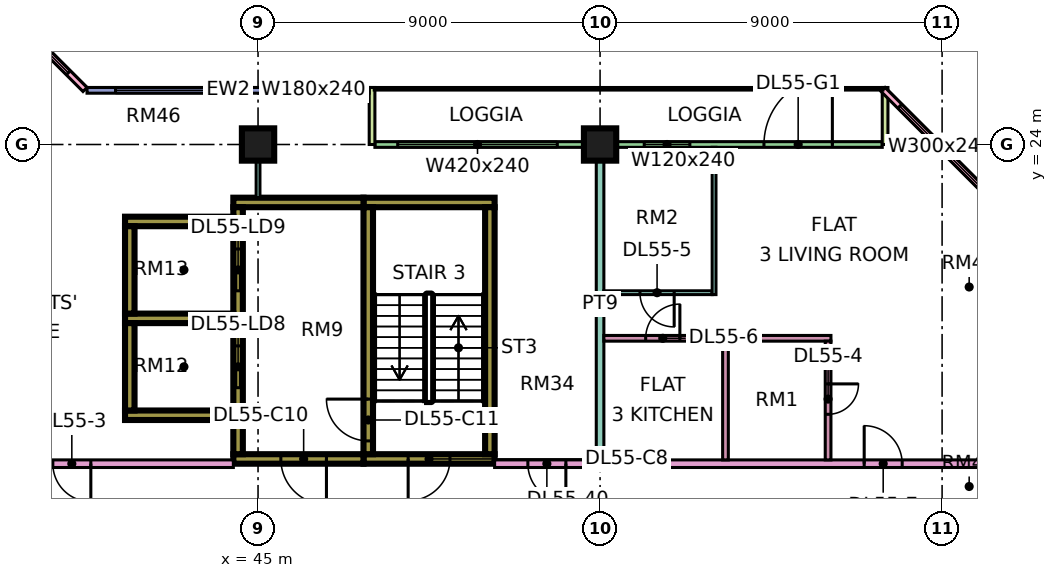
"""IFC4 building model, lengths in metres.
Left out: names, types, materials, properties, quantities, classifications, styles, units other than length and angle.
Written with IfcOpenShell. Run it as: python <this file> out.ifc"""

import sys

from ifc_helpers import new_model, si_unit, direction, frame, frame_2d, origin, origin_2d, place, context, subcontext, project, spatial, rectangle, extrude, element, fill, save


model = new_model("IFC4")
c1 = context("Model", 3, precision=1e-05, world=origin(), true_north=direction((0.0, 1.0)))
c2 = subcontext(c1, "Body", "Model", "MODEL_VIEW")
j1 = project(units=[si_unit("LENGTHUNIT", "METRE"), si_unit("PLANEANGLEUNIT", "RADIAN")], contexts=[c1])
p1 = place(None, origin())
s1 = spatial("IfcSite", under=j1, at=p1, CompositionType="ELEMENT")
p2 = place(p1, origin())
s2 = spatial("IfcBuilding", under=s1, at=p2, CompositionType="ELEMENT")
p3 = place(p2, frame((0.0, 0.0, 234.15)))
s3 = spatial("IfcBuildingStorey", under=s2, at=p3, CompositionType="ELEMENT", Elevation=234.15)
for number, where, z_axis, x_axis in (
    (1, (45.0, 24.0, 0.0), (0.0, 0.0, 1.0), (1.0, 0.0, 0.0)),
    (2, (54.0, 24.0, 0.0), (0.0, 0.0, 1.0), (1.0, 0.0, 0.0)),
):
    element("IfcColumn", number, at=place(p3, frame(where, z_axis=z_axis, x_axis=x_axis)), inside=s3, PredefinedType="COLUMN", context=c2, shape_type="SweptSolid", body=[
        extrude(rectangle(XDim=0.85, YDim=0.85, at=origin_2d()), origin(), (0.0, 0.0, 1.0), 3.75),
    ])
p4 = place(p3, frame((47.775, 15.725, 0.0), z_axis=(0.0, 0.0, 1.0), x_axis=(1.0, 0.0, 0.0)))
e3 = element("IfcWall", 3, at=p4, inside=s3, PredefinedType="SHEAR", context=c2, shape_type="SweptSolid", body=[
    extrude(rectangle(XDim=3.45, YDim=0.25, at=frame_2d((1.725, 0.0))), origin(), (0.0, 0.0, 1.0), 3.75),
])
p5 = place(p4, frame((1.175, 0.0, 0.0)))
e4 = element("IfcOpeningElement", 4, at=p5, cuts=e3, PredefinedType="OPENING", context=c2, shape_type="SweptSolid", body=[
    extrude(rectangle(XDim=1.1, YDim=2.2, at=frame_2d((0.55, 1.1))), frame((0.0, 0.135, 0.0), z_axis=(0.0, -1.0, 0.0), x_axis=(1.0, 0.0, 0.0)), (0.0, 0.0, 1.0), 0.27),
])
p6 = place(p3, frame((47.775, 22.475, 0.0), z_axis=(0.0, 0.0, 1.0), x_axis=(1.0, 0.0, 0.0)))
e5 = element("IfcWall", 5, at=p6, inside=s3, PredefinedType="SHEAR", context=c2, shape_type="SweptSolid", body=[
    extrude(rectangle(XDim=3.45, YDim=0.25, at=frame_2d((1.725, 0.0))), origin(), (0.0, 0.0, 1.0), 3.75),
])
p7 = place(p3, frame((47.9, 15.85, 0.0), z_axis=(0.0, 0.0, 1.0), x_axis=(0.0, 1.0, 0.0)))
e6 = element("IfcWall", 6, at=p7, inside=s3, PredefinedType="SHEAR", context=c2, shape_type="SweptSolid", body=[
    extrude(rectangle(XDim=6.5, YDim=0.25, at=frame_2d((3.25, 0.0))), origin(), (0.0, 0.0, 1.0), 3.75),
])
p8 = place(p7, frame((0.35, 0.0, 0.0)))
e7 = element("IfcOpeningElement", 7, at=p8, cuts=e6, PredefinedType="OPENING", context=c2, shape_type="SweptSolid", body=[
    extrude(rectangle(XDim=1.1, YDim=2.2, at=frame_2d((0.55, 1.1))), frame((0.0, 0.135, 0.0), z_axis=(0.0, -1.0, 0.0), x_axis=(1.0, 0.0, 0.0)), (0.0, 0.0, 1.0), 0.27),
])
p9 = place(p3, frame((51.1, 15.85, 0.0), z_axis=(0.0, 0.0, 1.0), x_axis=(0.0, 1.0, 0.0)))
e8 = element("IfcWall", 8, at=p9, inside=s3, PredefinedType="SHEAR", context=c2, shape_type="SweptSolid", body=[
    extrude(rectangle(XDim=6.5, YDim=0.25, at=frame_2d((3.25, 0.0))), origin(), (0.0, 0.0, 1.0), 3.75),
])
p10 = place(p3, frame((44.35, 15.725, 0.0), z_axis=(0.0, 0.0, 1.0), x_axis=(1.0, 0.0, 0.0)))
e9 = element("IfcWall", 9, at=p10, inside=s3, PredefinedType="SHEAR", context=c2, shape_type="SweptSolid", body=[
    extrude(rectangle(XDim=3.425, YDim=0.25, at=frame_2d((1.712, 0.0))), origin(), (0.0, 0.0, 1.0), 3.75),
])
p11 = place(p10, frame((1.25, 0.0, 0.0)))
e10 = element("IfcOpeningElement", 10, at=p11, cuts=e9, PredefinedType="OPENING", context=c2, shape_type="SweptSolid", body=[
    extrude(rectangle(XDim=1.2, YDim=2.2, at=frame_2d((0.6, 1.1))), frame((0.0, 0.135, 0.0), z_axis=(0.0, -1.0, 0.0), x_axis=(1.0, 0.0, 0.0)), (0.0, 0.0, 1.0), 0.27),
])
p12 = place(p3, frame((44.35, 22.475, 0.0), z_axis=(0.0, 0.0, 1.0), x_axis=(1.0, 0.0, 0.0)))
e11 = element("IfcWall", 11, at=p12, inside=s3, PredefinedType="SHEAR", context=c2, shape_type="SweptSolid", body=[
    extrude(rectangle(XDim=3.425, YDim=0.25, at=frame_2d((1.712, 0.0))), origin(), (0.0, 0.0, 1.0), 3.75),
])
p13 = place(p3, frame((44.475, 15.85, 0.0), z_axis=(0.0, 0.0, 1.0), x_axis=(0.0, 1.0, 0.0)))
e12 = element("IfcWall", 12, at=p13, inside=s3, PredefinedType="SHEAR", context=c2, shape_type="SweptSolid", body=[
    extrude(rectangle(XDim=6.5, YDim=0.25, at=frame_2d((3.25, 0.0))), origin(), (0.0, 0.0, 1.0), 3.75),
])
p14 = place(p13, frame((1.75, 0.0, 0.0)))
e13 = element("IfcOpeningElement", 13, at=p14, cuts=e12, PredefinedType="OPENING", context=c2, shape_type="SweptSolid", body=[
    extrude(rectangle(XDim=1.1, YDim=2.2, at=frame_2d((0.55, 1.1))), frame((0.0, 0.135, 0.0), z_axis=(0.0, -1.0, 0.0), x_axis=(1.0, 0.0, 0.0)), (0.0, 0.0, 1.0), 0.27),
])
p15 = place(p13, frame((4.3, 0.0, 0.0)))
e14 = element("IfcOpeningElement", 14, at=p15, cuts=e12, PredefinedType="OPENING", context=c2, shape_type="SweptSolid", body=[
    extrude(rectangle(XDim=1.1, YDim=2.2, at=frame_2d((0.55, 1.1))), frame((0.0, 0.135, 0.0), z_axis=(0.0, -1.0, 0.0), x_axis=(1.0, 0.0, 0.0)), (0.0, 0.0, 1.0), 0.27),
])
for number, where, z_axis, x_axis in (
    (15, (41.5, 16.875, 0.0), (0.0, 0.0, 1.0), (1.0, 0.0, 0.0)),
    (16, (41.5, 19.425, 0.0), (0.0, 0.0, 1.0), (1.0, 0.0, 0.0)),
    (17, (41.5, 21.975, 0.0), (0.0, 0.0, 1.0), (1.0, 0.0, 0.0)),
):
    element("IfcWall", number, at=place(p3, frame(where, z_axis=z_axis, x_axis=x_axis)), inside=s3, PredefinedType="SHEAR", context=c2, shape_type="SweptSolid", body=[
        extrude(rectangle(XDim=2.85, YDim=0.25, at=frame_2d((1.425, 0.0))), origin(), (0.0, 0.0, 1.0), 3.75),
    ])
for number, where, z_axis, x_axis in (
    (18, (41.625, 17.0, 0.0), (0.0, 0.0, 1.0), (0.0, 1.0, 0.0)),
    (19, (41.625, 19.55, 0.0), (0.0, 0.0, 1.0), (0.0, 1.0, 0.0)),
):
    element("IfcWall", number, at=place(p3, frame(where, z_axis=z_axis, x_axis=x_axis)), inside=s3, PredefinedType="SHEAR", context=c2, shape_type="SweptSolid", body=[
        extrude(rectangle(XDim=2.3, YDim=0.25, at=frame_2d((1.15, 0.0))), origin(), (0.0, 0.0, 1.0), 3.75),
    ])
p16 = place(p3, frame((61.425, 24.0, 0.0), z_axis=(0.0, 0.0, 1.0), x_axis=(-1.0, 0.0, 0.0)))
e20 = element("IfcWall", 20, at=p16, inside=s3, PredefinedType="SOLIDWALL", context=c2, shape_type="SweptSolid", body=[
    extrude(rectangle(XDim=13.35, YDim=0.15, at=frame_2d((6.675, 0.0))), origin(), (0.0, 0.0, 1.0), 3.35),
])
p17 = place(p16, frame((1.312, 0.0, 0.0)))
e21 = element("IfcOpeningElement", 21, at=p17, cuts=e20, PredefinedType="OPENING", context=c2, shape_type="SweptSolid", body=[
    extrude(rectangle(XDim=1.8, YDim=2.4, at=frame_2d((0.9, 1.2))), frame((0.0, 0.085, 0.0), z_axis=(0.0, -1.0, 0.0), x_axis=(1.0, 0.0, 0.0)), (0.0, 0.0, 1.0), 0.17),
])
p18 = place(p16, frame((5.062, 0.0, 0.45)))
e22 = element("IfcOpeningElement", 22, at=p18, cuts=e20, PredefinedType="OPENING", context=c2, shape_type="SweptSolid", body=[
    extrude(rectangle(XDim=1.2, YDim=2.4, at=frame_2d((0.6, 1.2))), frame((0.0, 0.085, 0.0), z_axis=(0.0, -1.0, 0.0), x_axis=(1.0, 0.0, 0.0)), (0.0, 0.0, 1.0), 0.17),
])
p19 = place(p16, frame((8.55, 0.0, 0.45)))
e23 = element("IfcOpeningElement", 23, at=p19, cuts=e20, PredefinedType="OPENING", context=c2, shape_type="SweptSolid", body=[
    extrude(rectangle(XDim=4.2, YDim=2.4, at=frame_2d((2.1, 1.2))), frame((0.0, 0.085, 0.0), z_axis=(0.0, -1.0, 0.0), x_axis=(1.0, 0.0, 0.0)), (0.0, 0.0, 1.0), 0.17),
])
for number, where, z_axis, x_axis in (
    (24, (61.5, 25.5, 0.0), (0.0, 0.0, 1.0), (0.0, -1.0, 0.0)),
    (25, (48.0, 25.5, 0.0), (0.0, 0.0, 1.0), (0.0, -1.0, 0.0)),
):
    element("IfcWall", number, at=place(p3, frame(where, z_axis=z_axis, x_axis=x_axis)), inside=s3, PredefinedType="SOLIDWALL", context=c2, shape_type="SweptSolid", body=[
        extrude(rectangle(XDim=1.5, YDim=0.15, at=frame_2d((0.75, 0.0))), origin(), (0.0, 0.0, 1.0), 3.35),
    ])
p20 = place(p3, frame((47.925, 25.425, 0.0), z_axis=(0.0, 0.0, 1.0), x_axis=(-1.0, 0.0, 0.0)))
e26 = element("IfcWall", 26, at=p20, inside=s3, PredefinedType="SOLIDWALL", context=c2, shape_type="SweptSolid", body=[
    extrude(rectangle(XDim=7.425, YDim=0.15, at=frame_2d((3.712, 0.0))), origin(), (0.0, 0.0, 1.0), 3.35),
])
p21 = place(p20, frame((0.562, 0.0, 0.45)))
e27 = element("IfcOpeningElement", 27, at=p21, cuts=e26, PredefinedType="OPENING", context=c2, shape_type="SweptSolid", body=[
    extrude(rectangle(XDim=1.8, YDim=2.4, at=frame_2d((0.9, 1.2))), frame((0.0, 0.085, 0.0), z_axis=(0.0, -1.0, 0.0), x_axis=(1.0, 0.0, 0.0)), (0.0, 0.0, 1.0), 0.17),
])
p22 = place(p20, frame((3.675, 0.0, 0.45)))
e28 = element("IfcOpeningElement", 28, at=p22, cuts=e26, PredefinedType="OPENING", context=c2, shape_type="SweptSolid", body=[
    extrude(rectangle(XDim=3.0, YDim=2.4, at=frame_2d((1.5, 1.2))), frame((0.0, 0.085, 0.0), z_axis=(0.0, -1.0, 0.0), x_axis=(1.0, 0.0, 0.0)), (0.0, 0.0, 1.0), 0.17),
])
p23 = place(p3, frame((40.447, 25.447, 0.0), z_axis=(0.0, 0.0, 1.0), x_axis=(-0.707106781187, 0.707106781187, 0.0)))
e29 = element("IfcWall", 29, at=p23, inside=s3, PredefinedType="SOLIDWALL", context=c2, shape_type="SweptSolid", body=[
    extrude(rectangle(XDim=4.243, YDim=0.15, at=frame_2d((2.121, 0.0))), origin(), (0.0, 0.0, 1.0), 3.35),
])
p24 = place(p23, frame((0.621, 0.0, 0.45)))
e30 = element("IfcOpeningElement", 30, at=p24, cuts=e29, PredefinedType="OPENING", context=c2, shape_type="SweptSolid", body=[
    extrude(rectangle(XDim=3.0, YDim=2.4, at=frame_2d((1.5, 1.2))), frame((0.0, 0.085, 0.0), z_axis=(0.0, -1.0, 0.0), x_axis=(1.0, 0.0, 0.0)), (0.0, 0.0, 1.0), 0.17),
])
p25 = place(p3, frame((64.447, 22.447, 0.0), z_axis=(0.0, 0.0, 1.0), x_axis=(-0.707106781187, 0.707106781187, 0.0)))
e31 = element("IfcWall", 31, at=p25, inside=s3, PredefinedType="SOLIDWALL", context=c2, shape_type="SweptSolid", body=[
    extrude(rectangle(XDim=4.243, YDim=0.15, at=frame_2d((2.121, 0.0))), origin(), (0.0, 0.0, 1.0), 3.35),
])
p26 = place(p25, frame((0.621, 0.0, 0.45)))
e32 = element("IfcOpeningElement", 32, at=p26, cuts=e31, PredefinedType="OPENING", context=c2, shape_type="SweptSolid", body=[
    extrude(rectangle(XDim=3.0, YDim=2.4, at=frame_2d((1.5, 1.2))), frame((0.0, 0.085, 0.0), z_axis=(0.0, -1.0, 0.0), x_axis=(1.0, 0.0, 0.0)), (0.0, 0.0, 1.0), 0.17),
])
p27 = place(p3, frame((34.0, 15.6, 0.0), z_axis=(0.0, 0.0, 1.0), x_axis=(1.0, 0.0, 0.0)))
e33 = element("IfcWall", 33, at=p27, inside=s3, PredefinedType="PARTITIONING", context=c2, shape_type="SweptSolid", body=[
    extrude(rectangle(XDim=10.35, YDim=0.2, at=frame_2d((5.175, 0.0))), origin(), (0.0, 0.0, 1.0), 3.35),
])
p28 = place(p27, frame((5.6, 0.0, 0.0)))
e34 = element("IfcOpeningElement", 34, at=p28, cuts=e33, PredefinedType="OPENING", context=c2, shape_type="SweptSolid", body=[
    extrude(rectangle(XDim=1.0, YDim=2.1, at=frame_2d((0.5, 1.05))), frame((0.0, 0.11, 0.0), z_axis=(0.0, -1.0, 0.0), x_axis=(1.0, 0.0, 0.0)), (0.0, 0.0, 1.0), 0.22),
])
p29 = place(p27, frame((0.45, 0.0, 0.0)))
e35 = element("IfcOpeningElement", 35, at=p29, cuts=e33, PredefinedType="OPENING", context=c2, shape_type="SweptSolid", body=[
    extrude(rectangle(XDim=1.2, YDim=2.1, at=frame_2d((0.6, 1.05))), frame((0.0, 0.11, 0.0), z_axis=(0.0, -1.0, 0.0), x_axis=(1.0, 0.0, 0.0)), (0.0, 0.0, 1.0), 0.22),
])
p30 = place(p3, frame((45.0, 22.6, 0.0), z_axis=(0.0, 0.0, 1.0), x_axis=(0.0, 1.0, 0.0)))
e36 = element("IfcWall", 36, at=p30, inside=s3, PredefinedType="PARTITIONING", context=c2, shape_type="SweptSolid", body=[
    extrude(rectangle(XDim=1.4, YDim=0.1, at=frame_2d((0.7, 0.0))), origin(), (0.0, 0.0, 1.0), 3.35),
])
p31 = place(p3, frame((51.225, 15.6, 0.0), z_axis=(0.0, 0.0, 1.0), x_axis=(1.0, 0.0, 0.0)))
e37 = element("IfcWall", 37, at=p31, inside=s3, PredefinedType="PARTITIONING", context=c2, shape_type="SweptSolid", body=[
    extrude(rectangle(XDim=13.125, YDim=0.2, at=frame_2d((6.562, 0.0))), origin(), (0.0, 0.0, 1.0), 3.35),
])
p32 = place(p31, frame((9.725, 0.0, 0.0)))
e38 = element("IfcOpeningElement", 38, at=p32, cuts=e37, PredefinedType="OPENING", context=c2, shape_type="SweptSolid", body=[
    extrude(rectangle(XDim=1.0, YDim=2.1, at=frame_2d((0.5, 1.05))), frame((0.0, 0.11, 0.0), z_axis=(0.0, -1.0, 0.0), x_axis=(1.0, 0.0, 0.0)), (0.0, 0.0, 1.0), 0.22),
])
p33 = place(p31, frame((0.875, 0.0, 0.0)))
e39 = element("IfcOpeningElement", 39, at=p33, cuts=e37, PredefinedType="OPENING", context=c2, shape_type="SweptSolid", body=[
    extrude(rectangle(XDim=1.0, YDim=2.1, at=frame_2d((0.5, 1.05))), frame((0.0, 0.11, 0.0), z_axis=(0.0, -1.0, 0.0), x_axis=(1.0, 0.0, 0.0)), (0.0, 0.0, 1.0), 0.22),
])
p34 = place(p3, frame((54.0, 15.7, 0.0), z_axis=(0.0, 0.0, 1.0), x_axis=(0.0, 1.0, 0.0)))
e40 = element("IfcWall", 40, at=p34, inside=s3, PredefinedType="PARTITIONING", context=c2, shape_type="SweptSolid", body=[
    extrude(rectangle(XDim=8.226, YDim=0.2, at=frame_2d((4.113, 0.0))), origin(), (0.0, 0.0, 1.0), 3.35),
])
p35 = place(p3, frame((54.1, 18.9, 0.0), z_axis=(0.0, 0.0, 1.0), x_axis=(1.0, 0.0, 0.0)))
e41 = element("IfcWall", 41, at=p35, inside=s3, PredefinedType="PARTITIONING", context=c2, shape_type="SweptSolid", body=[
    extrude(rectangle(XDim=5.975, YDim=0.15, at=frame_2d((2.987, 0.0))), origin(), (0.0, 0.0, 1.0), 3.35),
])
p36 = place(p35, frame((1.1, 0.0, 0.0)))
e42 = element("IfcOpeningElement", 42, at=p36, cuts=e41, PredefinedType="OPENING", context=c2, shape_type="SweptSolid", body=[
    extrude(rectangle(XDim=0.9, YDim=2.1, at=frame_2d((0.45, 1.05))), frame((0.0, 0.085, 0.0), z_axis=(0.0, -1.0, 0.0), x_axis=(1.0, 0.0, 0.0)), (0.0, 0.0, 1.0), 0.17),
])
p37 = place(p3, frame((54.1, 20.1, 0.0), z_axis=(0.0, 0.0, 1.0), x_axis=(1.0, 0.0, 0.0)))
e43 = element("IfcWall", 43, at=p37, inside=s3, PredefinedType="PARTITIONING", context=c2, shape_type="SweptSolid", body=[
    extrude(rectangle(XDim=2.85, YDim=0.1, at=frame_2d((1.425, 0.0))), origin(), (0.0, 0.0, 1.0), 3.35),
])
p38 = place(p37, frame((0.95, 0.0, 0.0)))
e44 = element("IfcOpeningElement", 44, at=p38, cuts=e43, PredefinedType="OPENING", context=c2, shape_type="SweptSolid", body=[
    extrude(rectangle(XDim=0.9, YDim=2.1, at=frame_2d((0.45, 1.05))), frame((0.0, 0.06, 0.0), z_axis=(0.0, -1.0, 0.0), x_axis=(1.0, 0.0, 0.0)), (0.0, 0.0, 1.0), 0.12),
])
p39 = place(p3, frame((57.0, 20.05, 0.0), z_axis=(0.0, 0.0, 1.0), x_axis=(0.0, 1.0, 0.0)))
e45 = element("IfcWall", 45, at=p39, inside=s3, PredefinedType="PARTITIONING", context=c2, shape_type="SweptSolid", body=[
    extrude(rectangle(XDim=3.876, YDim=0.1, at=frame_2d((1.938, 0.0))), origin(), (0.0, 0.0, 1.0), 3.35),
])
p40 = place(p3, frame((57.3, 15.7, 0.0), z_axis=(0.0, 0.0, 1.0), x_axis=(0.0, 1.0, 0.0)))
e46 = element("IfcWall", 46, at=p40, inside=s3, PredefinedType="PARTITIONING", context=c2, shape_type="SweptSolid", body=[
    extrude(rectangle(XDim=3.125, YDim=0.15, at=frame_2d((1.562, 0.0))), origin(), (0.0, 0.0, 1.0), 3.35),
])
p41 = place(p3, frame((60.0, 15.7, 0.0), z_axis=(0.0, 0.0, 1.0), x_axis=(0.0, 1.0, 0.0)))
e47 = element("IfcWall", 47, at=p41, inside=s3, PredefinedType="PARTITIONING", context=c2, shape_type="SweptSolid", body=[
    extrude(rectangle(XDim=3.125, YDim=0.15, at=frame_2d((1.562, 0.0))), origin(), (0.0, 0.0, 1.0), 3.35),
])
p42 = place(p41, frame((1.2, 0.0, 0.0)))
e48 = element("IfcOpeningElement", 48, at=p42, cuts=e47, PredefinedType="OPENING", context=c2, shape_type="SweptSolid", body=[
    extrude(rectangle(XDim=0.8, YDim=2.1, at=frame_2d((0.4, 1.05))), frame((0.0, 0.085, 0.0), z_axis=(0.0, -1.0, 0.0), x_axis=(1.0, 0.0, 0.0)), (0.0, 0.0, 1.0), 0.17),
])
p43 = place(p17, frame((1.8, 0.0, 0.0), z_axis=(0.0, 0.0, 1.0), x_axis=(-1.0, 0.0, 0.0)))
e49 = element("IfcDoor", 49, at=p43, inside=s3, OperationType="DOUBLE_DOOR_SINGLE_SWING", PredefinedType="DOOR", context=c2, shape_type="SweptSolid", body=[
    extrude(rectangle(XDim=1.8, YDim=2.4, at=frame_2d((0.9, 1.2))), frame((0.0, 0.025, 0.0), z_axis=(0.0, -1.0, 0.0), x_axis=(1.0, 0.0, 0.0)), (0.0, 0.0, 1.0), 0.05),
])
fill(e21, e49)
p44 = place(p18, origin())
e50 = element("IfcWindow", 50, at=p44, inside=s3, PartitioningType="SINGLE_PANEL", PredefinedType="WINDOW", context=c2, shape_type="SweptSolid", body=[
    extrude(rectangle(XDim=1.2, YDim=2.4, at=frame_2d((0.6, 1.2))), frame((0.0, 0.03, 0.0), z_axis=(0.0, -1.0, 0.0), x_axis=(1.0, 0.0, 0.0)), (0.0, 0.0, 1.0), 0.06),
])
fill(e22, e50)
p45 = place(p19, origin())
e51 = element("IfcWindow", 51, at=p45, inside=s3, PartitioningType="SINGLE_PANEL", PredefinedType="WINDOW", context=c2, shape_type="SweptSolid", body=[
    extrude(rectangle(XDim=4.2, YDim=2.4, at=frame_2d((2.1, 1.2))), frame((0.0, 0.03, 0.0), z_axis=(0.0, -1.0, 0.0), x_axis=(1.0, 0.0, 0.0)), (0.0, 0.0, 1.0), 0.06),
])
fill(e23, e51)
p46 = place(p21, origin())
e52 = element("IfcWindow", 52, at=p46, inside=s3, PartitioningType="SINGLE_PANEL", PredefinedType="WINDOW", context=c2, shape_type="SweptSolid", body=[
    extrude(rectangle(XDim=1.8, YDim=2.4, at=frame_2d((0.9, 1.2))), frame((0.0, 0.03, 0.0), z_axis=(0.0, -1.0, 0.0), x_axis=(1.0, 0.0, 0.0)), (0.0, 0.0, 1.0), 0.06),
])
fill(e27, e52)
p47 = place(p22, origin())
e53 = element("IfcWindow", 53, at=p47, inside=s3, PartitioningType="SINGLE_PANEL", PredefinedType="WINDOW", context=c2, shape_type="SweptSolid", body=[
    extrude(rectangle(XDim=3.0, YDim=2.4, at=frame_2d((1.5, 1.2))), frame((0.0, 0.03, 0.0), z_axis=(0.0, -1.0, 0.0), x_axis=(1.0, 0.0, 0.0)), (0.0, 0.0, 1.0), 0.06),
])
fill(e28, e53)
p48 = place(p24, origin())
e54 = element("IfcWindow", 54, at=p48, inside=s3, PartitioningType="SINGLE_PANEL", PredefinedType="WINDOW", context=c2, shape_type="SweptSolid", body=[
    extrude(rectangle(XDim=3.0, YDim=2.4, at=frame_2d((1.5, 1.2))), frame((0.0, 0.03, 0.0), z_axis=(0.0, -1.0, 0.0), x_axis=(1.0, 0.0, 0.0)), (0.0, 0.0, 1.0), 0.06),
])
fill(e30, e54)
p49 = place(p26, origin())
e55 = element("IfcWindow", 55, at=p49, inside=s3, PartitioningType="SINGLE_PANEL", PredefinedType="WINDOW", context=c2, shape_type="SweptSolid", body=[
    extrude(rectangle(XDim=3.0, YDim=2.4, at=frame_2d((1.5, 1.2))), frame((0.0, 0.03, 0.0), z_axis=(0.0, -1.0, 0.0), x_axis=(1.0, 0.0, 0.0)), (0.0, 0.0, 1.0), 0.06),
])
fill(e32, e55)
p50 = place(p5, frame((1.1, 0.0, 0.0), z_axis=(0.0, 0.0, 1.0), x_axis=(-1.0, 0.0, 0.0)))
e56 = element("IfcDoor", 56, at=p50, inside=s3, OperationType="SINGLE_SWING_LEFT", PredefinedType="DOOR", context=c2, shape_type="SweptSolid", body=[
    extrude(rectangle(XDim=1.1, YDim=2.2, at=frame_2d((0.55, 1.1))), frame((0.0, 0.025, 0.0), z_axis=(0.0, -1.0, 0.0), x_axis=(1.0, 0.0, 0.0)), (0.0, 0.0, 1.0), 0.05),
])
fill(e4, e56)
p51 = place(p11, origin())
e57 = element("IfcDoor", 57, at=p51, inside=s3, OperationType="SINGLE_SWING_RIGHT", PredefinedType="DOOR", context=c2, shape_type="SweptSolid", body=[
    extrude(rectangle(XDim=1.2, YDim=2.2, at=frame_2d((0.6, 1.1))), frame((0.0, 0.025, 0.0), z_axis=(0.0, -1.0, 0.0), x_axis=(1.0, 0.0, 0.0)), (0.0, 0.0, 1.0), 0.05),
])
fill(e10, e57)
p52 = place(p8, frame((1.1, 0.0, 0.0), z_axis=(0.0, 0.0, 1.0), x_axis=(-1.0, 0.0, 0.0)))
e58 = element("IfcDoor", 58, at=p52, inside=s3, OperationType="SINGLE_SWING_RIGHT", PredefinedType="DOOR", context=c2, shape_type="SweptSolid", body=[
    extrude(rectangle(XDim=1.1, YDim=2.2, at=frame_2d((0.55, 1.1))), frame((0.0, 0.025, 0.0), z_axis=(0.0, -1.0, 0.0), x_axis=(1.0, 0.0, 0.0)), (0.0, 0.0, 1.0), 0.05),
])
fill(e7, e58)
p53 = place(p14, origin())
e59 = element("IfcDoor", 59, at=p53, inside=s3, OperationType="DOUBLE_DOOR_SLIDING", PredefinedType="DOOR", context=c2, shape_type="SweptSolid", body=[
    extrude(rectangle(XDim=1.1, YDim=2.2, at=frame_2d((0.55, 1.1))), frame((0.0, 0.025, 0.0), z_axis=(0.0, -1.0, 0.0), x_axis=(1.0, 0.0, 0.0)), (0.0, 0.0, 1.0), 0.05),
])
fill(e13, e59)
p54 = place(p15, origin())
e60 = element("IfcDoor", 60, at=p54, inside=s3, OperationType="DOUBLE_DOOR_SLIDING", PredefinedType="DOOR", context=c2, shape_type="SweptSolid", body=[
    extrude(rectangle(XDim=1.1, YDim=2.2, at=frame_2d((0.55, 1.1))), frame((0.0, 0.025, 0.0), z_axis=(0.0, -1.0, 0.0), x_axis=(1.0, 0.0, 0.0)), (0.0, 0.0, 1.0), 0.05),
])
fill(e14, e60)
p55 = place(p28, origin())
e61 = element("IfcDoor", 61, at=p55, inside=s3, OperationType="SINGLE_SWING_RIGHT", PredefinedType="DOOR", context=c2, shape_type="SweptSolid", body=[
    extrude(rectangle(XDim=1.0, YDim=2.1, at=frame_2d((0.5, 1.05))), frame((0.0, 0.025, 0.0), z_axis=(0.0, -1.0, 0.0), x_axis=(1.0, 0.0, 0.0)), (0.0, 0.0, 1.0), 0.05),
])
fill(e34, e61)
p56 = place(p42, origin())
e62 = element("IfcDoor", 62, at=p56, inside=s3, OperationType="SINGLE_SWING_RIGHT", PredefinedType="DOOR", context=c2, shape_type="SweptSolid", body=[
    extrude(rectangle(XDim=0.8, YDim=2.1, at=frame_2d((0.4, 1.05))), frame((0.0, 0.025, 0.0), z_axis=(0.0, -1.0, 0.0), x_axis=(1.0, 0.0, 0.0)), (0.0, 0.0, 1.0), 0.05),
])
fill(e48, e62)
p57 = place(p38, origin())
e63 = element("IfcDoor", 63, at=p57, inside=s3, OperationType="SINGLE_SWING_RIGHT", PredefinedType="DOOR", context=c2, shape_type="SweptSolid", body=[
    extrude(rectangle(XDim=0.9, YDim=2.1, at=frame_2d((0.45, 1.05))), frame((0.0, 0.025, 0.0), z_axis=(0.0, -1.0, 0.0), x_axis=(1.0, 0.0, 0.0)), (0.0, 0.0, 1.0), 0.05),
])
fill(e44, e63)
p58 = place(p36, frame((0.9, 0.0, 0.0), z_axis=(0.0, 0.0, 1.0), x_axis=(-1.0, 0.0, 0.0)))
e64 = element("IfcDoor", 64, at=p58, inside=s3, OperationType="SINGLE_SWING_RIGHT", PredefinedType="DOOR", context=c2, shape_type="SweptSolid", body=[
    extrude(rectangle(XDim=0.9, YDim=2.1, at=frame_2d((0.45, 1.05))), frame((0.0, 0.025, 0.0), z_axis=(0.0, -1.0, 0.0), x_axis=(1.0, 0.0, 0.0)), (0.0, 0.0, 1.0), 0.05),
])
fill(e42, e64)
p59 = place(p32, origin())
e65 = element("IfcDoor", 65, at=p59, inside=s3, OperationType="SINGLE_SWING_LEFT", PredefinedType="DOOR", context=c2, shape_type="SweptSolid", body=[
    extrude(rectangle(XDim=1.0, YDim=2.1, at=frame_2d((0.5, 1.05))), frame((0.0, 0.025, 0.0), z_axis=(0.0, -1.0, 0.0), x_axis=(1.0, 0.0, 0.0)), (0.0, 0.0, 1.0), 0.05),
])
fill(e38, e65)
p60 = place(p33, origin())
e66 = element("IfcDoor", 66, at=p60, inside=s3, OperationType="SINGLE_SWING_RIGHT", PredefinedType="DOOR", context=c2, shape_type="SweptSolid", body=[
    extrude(rectangle(XDim=1.0, YDim=2.1, at=frame_2d((0.5, 1.05))), frame((0.0, 0.025, 0.0), z_axis=(0.0, -1.0, 0.0), x_axis=(1.0, 0.0, 0.0)), (0.0, 0.0, 1.0), 0.05),
])
fill(e39, e66)
save(model, sys.argv[1])
